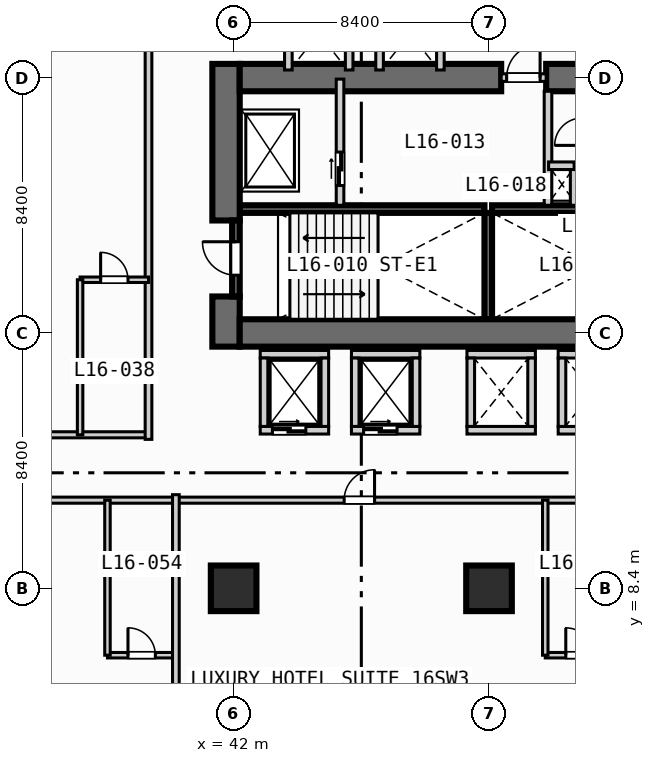
"""IFC4 building model, lengths in metres.
Left out: names, types, materials, properties, quantities, classifications, styles, units other than length and angle.
Written with IfcOpenShell. Run it as: python <this file> out.ifc"""

import sys

from ifc_helpers import new_model, si_unit, direction, frame, frame_2d, origin, origin_2d, place, context, subcontext, project, spatial, rectangle, extrude, element, fill, save


model = new_model("IFC4")
c1 = context("Model", 3, precision=1e-05, world=origin(), true_north=direction((0.0, 1.0)))
c2 = subcontext(c1, "Body", "Model", "MODEL_VIEW")
j1 = project(units=[si_unit("LENGTHUNIT", "METRE"), si_unit("PLANEANGLEUNIT", "RADIAN")], contexts=[c1])
p1 = place(None, origin())
s1 = spatial("IfcSite", under=j1, at=p1, CompositionType="ELEMENT")
p2 = place(p1, origin())
s2 = spatial("IfcBuilding", under=s1, at=p2, CompositionType="ELEMENT")
p3 = place(p2, frame((0.0, 0.0, 70.0)))
s3 = spatial("IfcBuildingStorey", under=s2, at=p3, CompositionType="ELEMENT", Elevation=70.0)
for number, where, z_axis, x_axis in (
    (1, (42.2, 20.875, 0.0), (0.0, 0.0, 1.0), (1.0, 0.0, 0.0)),
    (2, (50.5, 20.875, 0.0), (0.0, 0.0, 1.0), (1.0, 0.0, 0.0)),
):
    element("IfcWall", number, at=place(p3, frame(where, z_axis=z_axis, x_axis=x_axis)), inside=s3, PredefinedType="SOLIDWALL", context=c2, shape_type="SweptSolid", body=[
        extrude(rectangle(XDim=8.05, YDim=0.25, at=frame_2d((4.025, 0.0))), origin(), (0.0, 0.0, 1.0), 3.55),
    ])
p4 = place(p3, frame((50.375, 17.25, 0.0), z_axis=(0.0, 0.0, 1.0), x_axis=(0.0, 1.0, 0.0)))
e3 = element("IfcWall", 3, at=p4, inside=s3, PredefinedType="SOLIDWALL", context=c2, shape_type="SweptSolid", body=[
    extrude(rectangle(XDim=3.5, YDim=0.25, at=frame_2d((1.75, 0.0))), origin(), (0.0, 0.0, 1.0), 3.55),
])
p5 = place(p3, frame((41.75, 16.35, 0.0), z_axis=(0.0, 0.0, 1.0), x_axis=(0.0, 1.0, 0.0)))
e4 = element("IfcWall", 4, at=p5, inside=s3, PredefinedType="SHEAR", context=c2, shape_type="SweptSolid", body=[
    extrude(rectangle(XDim=1.65, YDim=0.9, at=frame_2d((0.825, 0.0))), origin(), (0.0, 0.0, 1.0), 3.55),
])
p6 = place(p3, frame((41.75, 20.5, 0.0), z_axis=(0.0, 0.0, 1.0), x_axis=(0.0, 1.0, 0.0)))
e5 = element("IfcWall", 5, at=p6, inside=s3, PredefinedType="SHEAR", context=c2, shape_type="SweptSolid", body=[
    extrude(rectangle(XDim=5.15, YDim=0.9, at=frame_2d((2.575, 0.0))), origin(), (0.0, 0.0, 1.0), 3.55),
])
p7 = place(p3, frame((42.2, 16.8, 0.0), z_axis=(0.0, 0.0, 1.0), x_axis=(1.0, 0.0, 0.0)))
e6 = element("IfcWall", 6, at=p7, inside=s3, PredefinedType="SHEAR", context=c2, shape_type="SweptSolid", body=[
    extrude(rectangle(XDim=16.35, YDim=0.9, at=frame_2d((8.175, 0.0))), origin(), (0.0, 0.0, 1.0), 3.55),
])
p8 = place(p3, frame((42.2, 25.2, 0.0), z_axis=(0.0, 0.0, 1.0), x_axis=(1.0, 0.0, 0.0)))
e7 = element("IfcWall", 7, at=p8, inside=s3, PredefinedType="SHEAR", context=c2, shape_type="SweptSolid", body=[
    extrude(rectangle(XDim=8.6, YDim=0.9, at=frame_2d((4.3, 0.0))), origin(), (0.0, 0.0, 1.0), 3.55),
])
p9 = place(p3, frame((52.28, 25.2, 0.0), z_axis=(0.0, 0.0, 1.0), x_axis=(1.0, 0.0, 0.0)))
e8 = element("IfcWall", 8, at=p9, inside=s3, PredefinedType="SHEAR", context=c2, shape_type="SweptSolid", body=[
    extrude(rectangle(XDim=1.27, YDim=0.9, at=frame_2d((0.635, 0.0))), origin(), (0.0, 0.0, 1.0), 3.55),
])
for number, where, z_axis, x_axis in (
    (9, (42.0, 8.4, 0.0), (0.0, 0.0, 1.0), (1.0, 0.0, 0.0)),
    (10, (50.4, 8.4, 0.0), (0.0, 0.0, 1.0), (1.0, 0.0, 0.0)),
):
    element("IfcColumn", number, at=place(p3, frame(where, z_axis=z_axis, x_axis=x_axis)), inside=s3, PredefinedType="COLUMN", context=c2, shape_type="SweptSolid", body=[
        extrude(rectangle(XDim=1.5, YDim=1.5, at=origin_2d()), origin(), (0.0, 0.0, 1.0), 3.8),
    ])
p10 = place(p3, frame((42.075, 18.0, 0.0), z_axis=(0.0, 0.0, 1.0), x_axis=(0.0, 1.0, 0.0)))
e11 = element("IfcWall", 11, at=p10, inside=s3, PredefinedType="SOLIDWALL", context=c2, shape_type="SweptSolid", body=[
    extrude(rectangle(XDim=2.5, YDim=0.25, at=frame_2d((1.25, 0.0))), origin(), (0.0, 0.0, 1.0), 3.55),
])
p11 = place(p10, frame((0.7, 0.0, 0.0)))
e12 = element("IfcOpeningElement", 12, at=p11, cuts=e11, PredefinedType="OPENING", context=c2, shape_type="SweptSolid", body=[
    extrude(rectangle(XDim=1.1, YDim=2.15, at=frame_2d((0.55, 1.075))), frame((0.0, 0.135, 0.0), z_axis=(0.0, -1.0, 0.0), x_axis=(1.0, 0.0, 0.0)), (0.0, 0.0, 1.0), 0.27),
])
p12 = place(p3, frame((45.5, 21.0, 0.0), z_axis=(0.0, 0.0, 1.0), x_axis=(0.0, 1.0, 0.0)))
e13 = element("IfcWall", 13, at=p12, inside=s3, PredefinedType="SOLIDWALL", context=c2, shape_type="SweptSolid", body=[
    extrude(rectangle(XDim=4.15, YDim=0.25, at=frame_2d((2.075, 0.0))), origin(), (0.0, 0.0, 1.0), 3.55),
])
p13 = place(p12, frame((0.65, 0.0, 0.0)))
e14 = element("IfcOpeningElement", 14, at=p13, cuts=e13, PredefinedType="OPENING", context=c2, shape_type="SweptSolid", body=[
    extrude(rectangle(XDim=1.1, YDim=2.15, at=frame_2d((0.55, 1.075))), frame((0.0, 0.135, 0.0), z_axis=(0.0, -1.0, 0.0), x_axis=(1.0, 0.0, 0.0)), (0.0, 0.0, 1.0), 0.27),
])
p14 = place(p3, frame((50.8, 25.2, 0.0), z_axis=(0.0, 0.0, 1.0), x_axis=(1.0, 0.0, 0.0)))
e15 = element("IfcWall", 15, at=p14, inside=s3, PredefinedType="SOLIDWALL", context=c2, shape_type="SweptSolid", body=[
    extrude(rectangle(XDim=1.48, YDim=0.25, at=frame_2d((0.74, 0.0))), origin(), (0.0, 0.0, 1.0), 3.55),
])
p15 = place(p14, frame((0.18, 0.0, 0.0)))
e16 = element("IfcOpeningElement", 16, at=p15, cuts=e15, PredefinedType="OPENING", context=c2, shape_type="SweptSolid", body=[
    extrude(rectangle(XDim=1.1, YDim=2.15, at=frame_2d((0.55, 1.075))), frame((0.0, 0.135, 0.0), z_axis=(0.0, -1.0, 0.0), x_axis=(1.0, 0.0, 0.0)), (0.0, 0.0, 1.0), 0.27),
])
p16 = place(p3, frame((52.34, 21.0, 0.0), z_axis=(0.0, 0.0, 1.0), x_axis=(0.0, 1.0, 0.0)))
e17 = element("IfcWall", 17, at=p16, inside=s3, PredefinedType="SOLIDWALL", context=c2, shape_type="SweptSolid", body=[
    extrude(rectangle(XDim=3.75, YDim=0.25, at=frame_2d((1.875, 0.0))), origin(), (0.0, 0.0, 1.0), 3.55),
])
p17 = place(p3, frame((53.2, 21.0, 0.0), z_axis=(0.0, 0.0, 1.0), x_axis=(0.0, 1.0, 0.0)))
e18 = element("IfcWall", 18, at=p17, inside=s3, PredefinedType="SOLIDWALL", context=c2, shape_type="SweptSolid", body=[
    extrude(rectangle(XDim=1.3, YDim=0.25, at=frame_2d((0.65, 0.0))), origin(), (0.0, 0.0, 1.0), 3.55),
])
p18 = place(p3, frame((52.36, 22.3, 0.0), z_axis=(0.0, 0.0, 1.0), x_axis=(1.0, 0.0, 0.0)))
e19 = element("IfcWall", 19, at=p18, inside=s3, PredefinedType="SOLIDWALL", context=c2, shape_type="SweptSolid", body=[
    extrude(rectangle(XDim=0.84, YDim=0.25, at=frame_2d((0.42, 0.0))), origin(), (0.0, 0.0, 1.0), 3.55),
])
p19 = place(p3, frame((42.875, 13.6, 0.0), z_axis=(0.0, 0.0, 1.0), x_axis=(1.0, 0.0, 0.0)))
e20 = element("IfcWall", 20, at=p19, inside=s3, PredefinedType="SOLIDWALL", context=c2, shape_type="SweptSolid", body=[
    extrude(rectangle(XDim=2.25, YDim=0.25, at=frame_2d((1.125, 0.0))), origin(), (0.0, 0.0, 1.0), 3.55),
])
p20 = place(p19, frame((0.4, 0.0, 0.0)))
e21 = element("IfcOpeningElement", 21, at=p20, cuts=e20, PredefinedType="OPENING", context=c2, shape_type="SweptSolid", body=[
    extrude(rectangle(XDim=1.1, YDim=2.15, at=frame_2d((0.55, 1.075))), frame((0.0, 0.135, 0.0), z_axis=(0.0, -1.0, 0.0), x_axis=(1.0, 0.0, 0.0)), (0.0, 0.0, 1.0), 0.27),
])
for number, where, z_axis, x_axis in (
    (22, (42.875, 16.1, 0.0), (0.0, 0.0, 1.0), (1.0, 0.0, 0.0)),
    (23, (43.0, 13.725, 0.0), (0.0, 0.0, 1.0), (0.0, 1.0, 0.0)),
    (24, (45.0, 13.725, 0.0), (0.0, 0.0, 1.0), (0.0, 1.0, 0.0)),
):
    element("IfcWall", number, at=place(p3, frame(where, z_axis=z_axis, x_axis=x_axis)), inside=s3, PredefinedType="SOLIDWALL", context=c2, shape_type="SweptSolid", body=[
        extrude(rectangle(XDim=2.25, YDim=0.25, at=frame_2d((1.125, 0.0))), origin(), (0.0, 0.0, 1.0), 3.55),
    ])
p21 = place(p3, frame((45.875, 13.6, 0.0), z_axis=(0.0, 0.0, 1.0), x_axis=(1.0, 0.0, 0.0)))
e25 = element("IfcWall", 25, at=p21, inside=s3, PredefinedType="SOLIDWALL", context=c2, shape_type="SweptSolid", body=[
    extrude(rectangle(XDim=2.25, YDim=0.25, at=frame_2d((1.125, 0.0))), origin(), (0.0, 0.0, 1.0), 3.55),
])
p22 = place(p21, frame((0.4, 0.0, 0.0)))
e26 = element("IfcOpeningElement", 26, at=p22, cuts=e25, PredefinedType="OPENING", context=c2, shape_type="SweptSolid", body=[
    extrude(rectangle(XDim=1.1, YDim=2.15, at=frame_2d((0.55, 1.075))), frame((0.0, 0.135, 0.0), z_axis=(0.0, -1.0, 0.0), x_axis=(1.0, 0.0, 0.0)), (0.0, 0.0, 1.0), 0.27),
])
for number, where, z_axis, x_axis in (
    (27, (45.875, 16.1, 0.0), (0.0, 0.0, 1.0), (1.0, 0.0, 0.0)),
    (28, (46.0, 13.725, 0.0), (0.0, 0.0, 1.0), (0.0, 1.0, 0.0)),
    (29, (48.0, 13.725, 0.0), (0.0, 0.0, 1.0), (0.0, 1.0, 0.0)),
    (30, (49.675, 13.6, 0.0), (0.0, 0.0, 1.0), (1.0, 0.0, 0.0)),
    (31, (49.675, 16.1, 0.0), (0.0, 0.0, 1.0), (1.0, 0.0, 0.0)),
    (32, (49.8, 13.725, 0.0), (0.0, 0.0, 1.0), (0.0, 1.0, 0.0)),
    (33, (51.8, 13.725, 0.0), (0.0, 0.0, 1.0), (0.0, 1.0, 0.0)),
    (34, (52.675, 13.6, 0.0), (0.0, 0.0, 1.0), (1.0, 0.0, 0.0)),
    (35, (52.675, 16.1, 0.0), (0.0, 0.0, 1.0), (1.0, 0.0, 0.0)),
    (36, (52.8, 13.725, 0.0), (0.0, 0.0, 1.0), (0.0, 1.0, 0.0)),
):
    element("IfcWall", number, at=place(p3, frame(where, z_axis=z_axis, x_axis=x_axis)), inside=s3, PredefinedType="SOLIDWALL", context=c2, shape_type="SweptSolid", body=[
        extrude(rectangle(XDim=2.25, YDim=0.25, at=frame_2d((1.125, 0.0))), origin(), (0.0, 0.0, 1.0), 3.55),
    ])
for number, where, z_axis, x_axis in (
    (37, (43.8, 25.45, 0.0), (0.0, 0.0, 1.0), (0.0, 1.0, 0.0)),
    (38, (45.8, 25.45, 0.0), (0.0, 0.0, 1.0), (0.0, 1.0, 0.0)),
    (39, (46.8, 25.45, 0.0), (0.0, 0.0, 1.0), (0.0, 1.0, 0.0)),
    (40, (48.8, 25.45, 0.0), (0.0, 0.0, 1.0), (0.0, 1.0, 0.0)),
):
    element("IfcWall", number, at=place(p3, frame(where, z_axis=z_axis, x_axis=x_axis)), inside=s3, PredefinedType="SOLIDWALL", context=c2, shape_type="SweptSolid", body=[
        extrude(rectangle(XDim=2.325, YDim=0.25, at=frame_2d((1.163, 0.0))), origin(), (0.0, 0.0, 1.0), 3.55),
    ])
p23 = place(p3, frame((25.6, 13.45, 0.0), z_axis=(0.0, 0.0, 1.0), x_axis=(1.0, 0.0, 0.0)))
e41 = element("IfcWall", 41, at=p23, inside=s3, PredefinedType="PARTITIONING", context=c2, shape_type="SweptSolid", body=[
    extrude(rectangle(XDim=13.6, YDim=0.2, at=frame_2d((6.8, 0.0))), origin(), (0.0, 0.0, 1.0), 3.55),
])
p24 = place(p23, frame((1.735, 0.0, 0.0)))
e42 = element("IfcOpeningElement", 42, at=p24, cuts=e41, PredefinedType="OPENING", context=c2, shape_type="SweptSolid", body=[
    extrude(rectangle(XDim=1.0, YDim=2.15, at=frame_2d((0.5, 1.075))), frame((0.0, 0.11, 0.0), z_axis=(0.0, -1.0, 0.0), x_axis=(1.0, 0.0, 0.0)), (0.0, 0.0, 1.0), 0.22),
])
p25 = place(p23, frame((8.535, 0.0, 0.0)))
e43 = element("IfcOpeningElement", 43, at=p25, cuts=e41, PredefinedType="OPENING", context=c2, shape_type="SweptSolid", body=[
    extrude(rectangle(XDim=1.0, YDim=2.15, at=frame_2d((0.5, 1.075))), frame((0.0, 0.11, 0.0), z_axis=(0.0, -1.0, 0.0), x_axis=(1.0, 0.0, 0.0)), (0.0, 0.0, 1.0), 0.22),
])
p26 = place(p3, frame((39.2, 13.3, 0.0), z_axis=(0.0, 0.0, 1.0), x_axis=(0.0, 1.0, 0.0)))
e44 = element("IfcWall", 44, at=p26, inside=s3, PredefinedType="PARTITIONING", context=c2, shape_type="SweptSolid", body=[
    extrude(rectangle(XDim=20.13, YDim=0.22, at=frame_2d((10.065, 0.0))), origin(), (0.0, 0.0, 1.0), 3.55),
])
p27 = place(p3, frame((36.95, 18.55, 0.0), z_axis=(0.0, 0.0, 1.0), x_axis=(1.0, 0.0, 0.0)))
e45 = element("IfcWall", 45, at=p27, inside=s3, PredefinedType="PLUMBINGWALL", context=c2, shape_type="SweptSolid", body=[
    extrude(rectangle(XDim=2.25, YDim=0.18, at=frame_2d((1.125, 0.0))), origin(), (0.0, 0.0, 1.0), 3.55),
])
p28 = place(p27, frame((0.675, 0.0, 0.0)))
e46 = element("IfcOpeningElement", 46, at=p28, cuts=e45, PredefinedType="OPENING", context=c2, shape_type="SweptSolid", body=[
    extrude(rectangle(XDim=0.9, YDim=2.1, at=frame_2d((0.45, 1.05))), frame((0.0, 0.1, 0.0), z_axis=(0.0, -1.0, 0.0), x_axis=(1.0, 0.0, 0.0)), (0.0, 0.0, 1.0), 0.2),
])
p29 = place(p3, frame((36.95, 13.45, 0.0), z_axis=(0.0, 0.0, 1.0), x_axis=(0.0, 1.0, 0.0)))
e47 = element("IfcWall", 47, at=p29, inside=s3, PredefinedType="PLUMBINGWALL", context=c2, shape_type="SweptSolid", body=[
    extrude(rectangle(XDim=5.1, YDim=0.18, at=frame_2d((2.55, 0.0))), origin(), (0.0, 0.0, 1.0), 3.55),
])
p30 = place(p3, frame((13.7, 11.3, 0.0), z_axis=(0.0, 0.0, 1.0), x_axis=(1.0, 0.0, 0.0)))
e48 = element("IfcWall", 48, at=p30, inside=s3, PredefinedType="PARTITIONING", context=c2, shape_type="SweptSolid", body=[
    extrude(rectangle(XDim=50.1, YDim=0.2, at=frame_2d((25.05, 0.0))), origin(), (0.0, 0.0, 1.0), 3.55),
])
p31 = place(p30, frame((3.61, 0.0, 0.0)))
e49 = element("IfcOpeningElement", 49, at=p31, cuts=e48, PredefinedType="OPENING", context=c2, shape_type="SweptSolid", body=[
    extrude(rectangle(XDim=1.0, YDim=2.15, at=frame_2d((0.5, 1.075))), frame((0.0, 0.11, 0.0), z_axis=(0.0, -1.0, 0.0), x_axis=(1.0, 0.0, 0.0)), (0.0, 0.0, 1.0), 0.22),
])
p32 = place(p30, frame((16.81, 0.0, 0.0)))
e50 = element("IfcOpeningElement", 50, at=p32, cuts=e48, PredefinedType="OPENING", context=c2, shape_type="SweptSolid", body=[
    extrude(rectangle(XDim=1.0, YDim=2.15, at=frame_2d((0.5, 1.075))), frame((0.0, 0.11, 0.0), z_axis=(0.0, -1.0, 0.0), x_axis=(1.0, 0.0, 0.0)), (0.0, 0.0, 1.0), 0.22),
])
p33 = place(p30, frame((31.935, 0.0, 0.0)))
e51 = element("IfcOpeningElement", 51, at=p33, cuts=e48, PredefinedType="OPENING", context=c2, shape_type="SweptSolid", body=[
    extrude(rectangle(XDim=1.0, YDim=2.15, at=frame_2d((0.5, 1.075))), frame((0.0, 0.11, 0.0), z_axis=(0.0, -1.0, 0.0), x_axis=(1.0, 0.0, 0.0)), (0.0, 0.0, 1.0), 0.22),
])
p34 = place(p30, frame((43.785, 0.0, 0.0)))
e52 = element("IfcOpeningElement", 52, at=p34, cuts=e48, PredefinedType="OPENING", context=c2, shape_type="SweptSolid", body=[
    extrude(rectangle(XDim=1.0, YDim=2.15, at=frame_2d((0.5, 1.075))), frame((0.0, 0.11, 0.0), z_axis=(0.0, -1.0, 0.0), x_axis=(1.0, 0.0, 0.0)), (0.0, 0.0, 1.0), 0.22),
])
p35 = place(p3, frame((37.85, 6.2, 0.0), z_axis=(0.0, 0.0, 1.0), x_axis=(1.0, 0.0, 0.0)))
e53 = element("IfcWall", 53, at=p35, inside=s3, PredefinedType="PLUMBINGWALL", context=c2, shape_type="SweptSolid", body=[
    extrude(rectangle(XDim=2.25, YDim=0.18, at=frame_2d((1.125, 0.0))), origin(), (0.0, 0.0, 1.0), 3.55),
])
p36 = place(p35, frame((0.675, 0.0, 0.0)))
e54 = element("IfcOpeningElement", 54, at=p36, cuts=e53, PredefinedType="OPENING", context=c2, shape_type="SweptSolid", body=[
    extrude(rectangle(XDim=0.9, YDim=2.1, at=frame_2d((0.45, 1.05))), frame((0.0, 0.1, 0.0), z_axis=(0.0, -1.0, 0.0), x_axis=(1.0, 0.0, 0.0)), (0.0, 0.0, 1.0), 0.2),
])
p37 = place(p3, frame((37.85, 6.2, 0.0), z_axis=(0.0, 0.0, 1.0), x_axis=(0.0, 1.0, 0.0)))
e55 = element("IfcWall", 55, at=p37, inside=s3, PredefinedType="PLUMBINGWALL", context=c2, shape_type="SweptSolid", body=[
    extrude(rectangle(XDim=5.1, YDim=0.18, at=frame_2d((2.55, 0.0))), origin(), (0.0, 0.0, 1.0), 3.55),
])
p38 = place(p3, frame((40.1, 0.2, 0.0), z_axis=(0.0, 0.0, 1.0), x_axis=(0.0, 1.0, 0.0)))
e56 = element("IfcWall", 56, at=p38, inside=s3, PredefinedType="PARTITIONING", context=c2, shape_type="SweptSolid", body=[
    extrude(rectangle(XDim=11.28, YDim=0.22, at=frame_2d((5.64, 0.0))), origin(), (0.0, 0.0, 1.0), 3.55),
])
p39 = place(p3, frame((52.25, 6.2, 0.0), z_axis=(0.0, 0.0, 1.0), x_axis=(1.0, 0.0, 0.0)))
e57 = element("IfcWall", 57, at=p39, inside=s3, PredefinedType="PLUMBINGWALL", context=c2, shape_type="SweptSolid", body=[
    extrude(rectangle(XDim=2.25, YDim=0.18, at=frame_2d((1.125, 0.0))), origin(), (0.0, 0.0, 1.0), 3.55),
])
p40 = place(p39, frame((0.675, 0.0, 0.0)))
e58 = element("IfcOpeningElement", 58, at=p40, cuts=e57, PredefinedType="OPENING", context=c2, shape_type="SweptSolid", body=[
    extrude(rectangle(XDim=0.9, YDim=2.1, at=frame_2d((0.45, 1.05))), frame((0.0, 0.1, 0.0), z_axis=(0.0, -1.0, 0.0), x_axis=(1.0, 0.0, 0.0)), (0.0, 0.0, 1.0), 0.2),
])
p41 = place(p3, frame((52.25, 6.2, 0.0), z_axis=(0.0, 0.0, 1.0), x_axis=(0.0, 1.0, 0.0)))
e59 = element("IfcWall", 59, at=p41, inside=s3, PredefinedType="PLUMBINGWALL", context=c2, shape_type="SweptSolid", body=[
    extrude(rectangle(XDim=5.1, YDim=0.18, at=frame_2d((2.55, 0.0))), origin(), (0.0, 0.0, 1.0), 3.55),
])
p42 = place(p11, origin())
e60 = element("IfcDoor", 60, at=p42, inside=s3, OperationType="SINGLE_SWING_RIGHT", PredefinedType="DOOR", context=c2, shape_type="SweptSolid", body=[
    extrude(rectangle(XDim=1.1, YDim=2.15, at=frame_2d((0.55, 1.075))), frame((0.0, 0.025, 0.0), z_axis=(0.0, -1.0, 0.0), x_axis=(1.0, 0.0, 0.0)), (0.0, 0.0, 1.0), 0.05),
])
fill(e12, e60)
p43 = place(p13, origin())
e61 = element("IfcDoor", 61, at=p43, inside=s3, OperationType="SLIDING_TO_LEFT", PredefinedType="DOOR", context=c2, shape_type="SweptSolid", body=[
    extrude(rectangle(XDim=1.1, YDim=2.15, at=frame_2d((0.55, 1.075))), frame((0.0, 0.025, 0.0), z_axis=(0.0, -1.0, 0.0), x_axis=(1.0, 0.0, 0.0)), (0.0, 0.0, 1.0), 0.05),
])
fill(e14, e61)
p44 = place(p15, origin())
e62 = element("IfcDoor", 62, at=p44, inside=s3, OperationType="SINGLE_SWING_RIGHT", PredefinedType="DOOR", context=c2, shape_type="SweptSolid", body=[
    extrude(rectangle(XDim=1.1, YDim=2.15, at=frame_2d((0.55, 1.075))), frame((0.0, 0.025, 0.0), z_axis=(0.0, -1.0, 0.0), x_axis=(1.0, 0.0, 0.0)), (0.0, 0.0, 1.0), 0.05),
])
fill(e16, e62)
p45 = place(p20, origin())
e63 = element("IfcDoor", 63, at=p45, inside=s3, OperationType="SLIDING_TO_LEFT", PredefinedType="DOOR", context=c2, shape_type="SweptSolid", body=[
    extrude(rectangle(XDim=1.1, YDim=2.15, at=frame_2d((0.55, 1.075))), frame((0.0, 0.025, 0.0), z_axis=(0.0, -1.0, 0.0), x_axis=(1.0, 0.0, 0.0)), (0.0, 0.0, 1.0), 0.05),
])
fill(e21, e63)
p46 = place(p22, origin())
e64 = element("IfcDoor", 64, at=p46, inside=s3, OperationType="SLIDING_TO_LEFT", PredefinedType="DOOR", context=c2, shape_type="SweptSolid", body=[
    extrude(rectangle(XDim=1.1, YDim=2.15, at=frame_2d((0.55, 1.075))), frame((0.0, 0.025, 0.0), z_axis=(0.0, -1.0, 0.0), x_axis=(1.0, 0.0, 0.0)), (0.0, 0.0, 1.0), 0.05),
])
fill(e26, e64)
p47 = place(p28, origin())
e65 = element("IfcDoor", 65, at=p47, inside=s3, OperationType="SINGLE_SWING_LEFT", PredefinedType="DOOR", context=c2, shape_type="SweptSolid", body=[
    extrude(rectangle(XDim=0.9, YDim=2.1, at=frame_2d((0.45, 1.05))), frame((0.0, 0.025, 0.0), z_axis=(0.0, -1.0, 0.0), x_axis=(1.0, 0.0, 0.0)), (0.0, 0.0, 1.0), 0.05),
])
fill(e46, e65)
p48 = place(p33, origin())
e66 = element("IfcDoor", 66, at=p48, inside=s3, OperationType="SINGLE_SWING_RIGHT", PredefinedType="DOOR", context=c2, shape_type="SweptSolid", body=[
    extrude(rectangle(XDim=1.0, YDim=2.15, at=frame_2d((0.5, 1.075))), frame((0.0, 0.025, 0.0), z_axis=(0.0, -1.0, 0.0), x_axis=(1.0, 0.0, 0.0)), (0.0, 0.0, 1.0), 0.05),
])
fill(e51, e66)
p49 = place(p36, origin())
e67 = element("IfcDoor", 67, at=p49, inside=s3, OperationType="SINGLE_SWING_LEFT", PredefinedType="DOOR", context=c2, shape_type="SweptSolid", body=[
    extrude(rectangle(XDim=0.9, YDim=2.1, at=frame_2d((0.45, 1.05))), frame((0.0, 0.025, 0.0), z_axis=(0.0, -1.0, 0.0), x_axis=(1.0, 0.0, 0.0)), (0.0, 0.0, 1.0), 0.05),
])
fill(e54, e67)
p50 = place(p40, origin())
e68 = element("IfcDoor", 68, at=p50, inside=s3, OperationType="SINGLE_SWING_LEFT", PredefinedType="DOOR", context=c2, shape_type="SweptSolid", body=[
    extrude(rectangle(XDim=0.9, YDim=2.1, at=frame_2d((0.45, 1.05))), frame((0.0, 0.025, 0.0), z_axis=(0.0, -1.0, 0.0), x_axis=(1.0, 0.0, 0.0)), (0.0, 0.0, 1.0), 0.05),
])
fill(e58, e68)
save(model, sys.argv[1])
